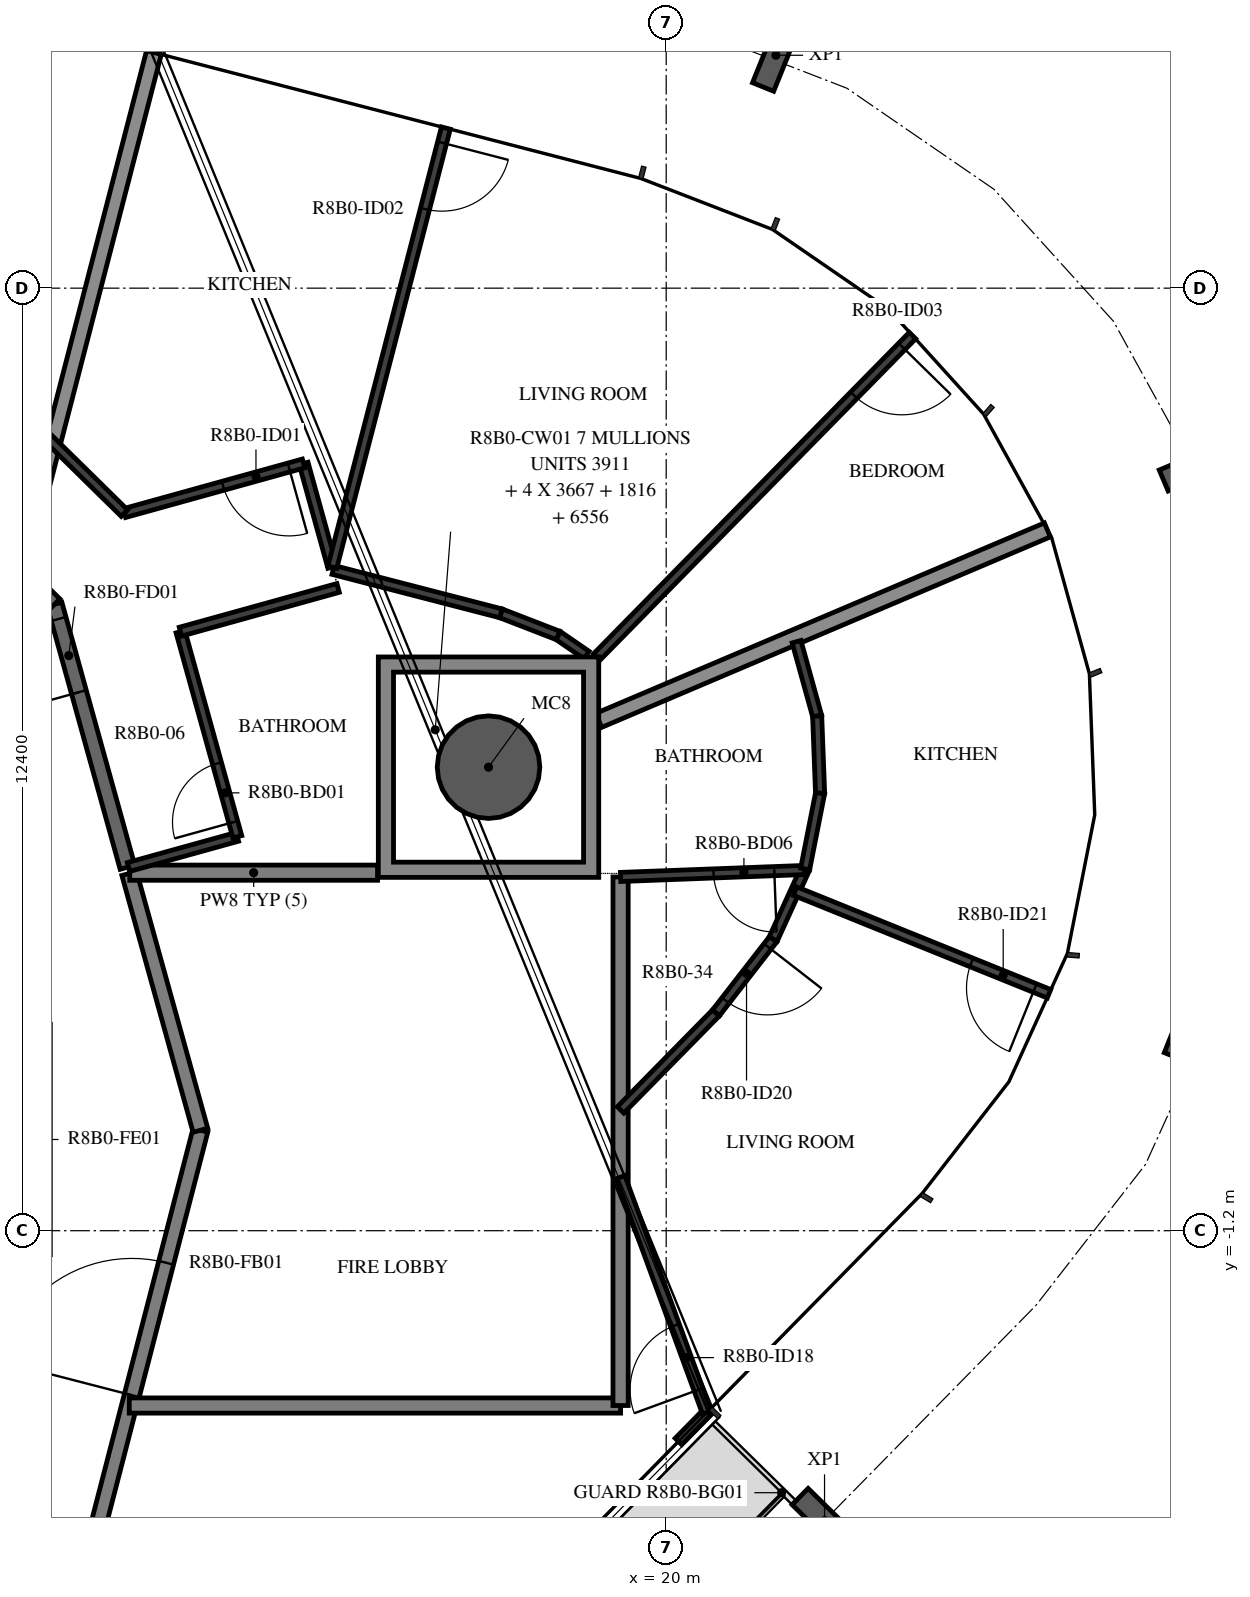
"""IFC4 building model, lengths in metres.
Left out: names, types, materials, properties, quantities, classifications, styles, units other than length and angle.
Written with IfcOpenShell. Run it as: python <this file> out.ifc"""

import sys

from ifc_helpers import new_model, si_unit, direction, frame, frame_2d, origin, origin_2d, place, context, subcontext, project, spatial, polyline, rectangle, hollow_circle, i_section, outline, extrude, element, fill, save


model = new_model("IFC4")
c1 = context("Model", 3, precision=1e-05, world=origin(), true_north=direction((0.0, 1.0)))
c2 = subcontext(c1, "Body", "Model", "MODEL_VIEW")
j1 = project(units=[si_unit("LENGTHUNIT", "METRE"), si_unit("PLANEANGLEUNIT", "RADIAN")], contexts=[c1])
p1 = place(None, origin())
s1 = spatial("IfcSite", under=j1, at=p1, CompositionType="ELEMENT")
p2 = place(p1, origin())
s2 = spatial("IfcBuilding", under=s1, at=p2, CompositionType="ELEMENT")
p3 = place(p2, frame((0.0, 0.0, 312.2)))
s3 = spatial("IfcBuildingStorey", under=s2, at=p3, CompositionType="ELEMENT", Elevation=312.2)
p4 = place(p3, frame((17.663, 4.898, -0.38), z_axis=(0.0, 0.0, 1.0), x_axis=(1.0, 0.0, 0.0)))
e1 = element("IfcColumn", 1, at=p4, inside=s3, PredefinedType="COLUMN", context=c2, shape_type="SweptSolid", body=[
    extrude(hollow_circle(Radius=0.675, WallThickness=0.03, at=origin_2d()), origin(), (0.0, 0.0, 1.0), 3.5),
])
for number, where, z_axis, x_axis in (
    (2, (22.083, -5.013, -0.38), (0.0, 0.0, 1.0), (-0.701, -0.713, 0.0)),
    (3, (27.026, 1.113, -0.38), (0.0, 0.0, 1.0), (-0.375, -0.927, 0.0)),
    (4, (26.96, 8.845, -0.38), (0.0, 0.0, 1.0), (0.391, -0.92, 0.0)),
    (5, (21.443, 14.264, -0.38), (0.0, 0.0, 1.0), (0.927, -0.374, 0.0)),
):
    element("IfcColumn", number, at=place(p3, frame(where, z_axis=z_axis, x_axis=x_axis)), inside=s3, PredefinedType="COLUMN", context=c2, shape_type="SweptSolid", body=[
        extrude(i_section(OverallWidth=0.3, OverallDepth=0.9, WebThickness=0.019, FlangeThickness=0.035, FilletRadius=0.03, at=origin_2d()), origin(), (0.0, 0.0, 1.0), 3.5),
    ])
p5 = place(p3, frame((12.074, -6.831, 0.0), z_axis=(0.0, 0.0, 1.0), x_axis=(0.250391063186, 0.968144780225, 0.0)))
e6 = element("IfcWall", 6, at=p5, inside=s3, PredefinedType="STANDARD", context=c2, shape_type="SweptSolid", body=[
    extrude(rectangle(XDim=7.181, YDim=0.2, at=frame_2d((3.591, 0.0))), origin(), (0.0, 0.0, 1.0), 3.12),
])
p6 = place(p5, frame((3.581, 0.0, 0.0)))
e7 = element("IfcOpeningElement", 7, at=p6, cuts=e6, PredefinedType="OPENING", context=c2, shape_type="SweptSolid", body=[
    extrude(rectangle(XDim=1.8, YDim=2.1, at=frame_2d((0.9, 1.05))), frame((0.0, 0.11, 0.0), z_axis=(0.0, -1.0, 0.0), x_axis=(1.0, 0.0, 0.0)), (0.0, 0.0, 1.0), 0.22),
])
p7 = place(p3, frame((13.872, 0.121, 0.0), z_axis=(0.0, 0.0, 1.0), x_axis=(-0.267291928416, 0.963615600228, 0.0)))
e8 = element("IfcWall", 8, at=p7, inside=s3, PredefinedType="STANDARD", context=c2, shape_type="SweptSolid", body=[
    extrude(rectangle(XDim=3.507, YDim=0.2, at=frame_2d((1.753, 0.0))), origin(), (0.0, 0.0, 1.0), 3.12),
])
p8 = place(p3, frame((12.913, 3.581, 0.0), z_axis=(0.0, 0.0, 1.0), x_axis=(-0.267223005422, 0.963634715737, 0.0)))
e9 = element("IfcWall", 9, at=p8, inside=s3, PredefinedType="STANDARD", context=c2, shape_type="SweptSolid", body=[
    extrude(rectangle(XDim=3.591, YDim=0.2, at=frame_2d((1.795, 0.0))), origin(), (0.0, 0.0, 1.0), 3.12),
])
p9 = place(p8, frame((2.39, 0.0, 0.0)))
e10 = element("IfcOpeningElement", 10, at=p9, cuts=e9, PredefinedType="OPENING", context=c2, shape_type="SweptSolid", body=[
    extrude(rectangle(XDim=1.0, YDim=2.1, at=frame_2d((0.5, 1.05))), frame((0.0, 0.11, 0.0), z_axis=(0.0, -1.0, 0.0), x_axis=(1.0, 0.0, 0.0)), (0.0, 0.0, 1.0), 0.22),
])
p10 = place(p3, frame((11.953, 7.041, 0.0), z_axis=(0.0, 0.0, 1.0), x_axis=(-0.713250549143, 0.70090916255, 0.0)))
e11 = element("IfcWall", 11, at=p10, inside=s3, PredefinedType="STANDARD", context=c2, shape_type="SweptSolid", body=[
    extrude(rectangle(XDim=7.181, YDim=0.2, at=frame_2d((3.59, 0.0))), origin(), (0.0, 0.0, 1.0), 3.12),
])
p11 = place(p10, frame((2.637, 0.0, 0.0)))
e12 = element("IfcOpeningElement", 12, at=p11, cuts=e11, PredefinedType="OPENING", context=c2, shape_type="SweptSolid", body=[
    extrude(rectangle(XDim=1.0, YDim=2.1, at=frame_2d((0.5, 1.05))), frame((0.0, 0.11, 0.0), z_axis=(0.0, -1.0, 0.0), x_axis=(1.0, 0.0, 0.0)), (0.0, 0.0, 1.0), 0.22),
])
p12 = place(p3, frame((16.203, 3.51, 0.0), z_axis=(0.0, 0.0, 1.0), x_axis=(-1.0, 0.0, 0.0)))
e13 = element("IfcWall", 13, at=p12, inside=s3, PredefinedType="STANDARD", context=c2, shape_type="SweptSolid", body=[
    extrude(rectangle(XDim=3.26, YDim=0.2, at=frame_2d((1.63, 0.0))), origin(), (0.0, 0.0, 1.0), 3.12),
])
p13 = place(p3, frame((12.936, -3.5, 0.0), z_axis=(0.0, 0.0, 1.0), x_axis=(1.0, 0.0, 0.0)))
e14 = element("IfcWall", 14, at=p13, inside=s3, PredefinedType="STANDARD", context=c2, shape_type="SweptSolid", body=[
    extrude(rectangle(XDim=6.464, YDim=0.2, at=frame_2d((3.232, 0.0))), origin(), (0.0, 0.0, 1.0), 3.12),
])
p14 = place(p3, frame((19.4, -3.5, 0.0), z_axis=(0.0, 0.0, 1.0), x_axis=(0.0, 1.0, 0.0)))
e15 = element("IfcWall", 15, at=p14, inside=s3, PredefinedType="STANDARD", context=c2, shape_type="SweptSolid", body=[
    extrude(rectangle(XDim=6.954, YDim=0.2, at=frame_2d((3.477, 0.0))), origin(), (0.0, 0.0, 1.0), 3.12),
])
p15 = place(p3, frame((13.26, 14.3, 0.0), z_axis=(0.0, 0.0, 1.0), x_axis=(-0.250397400042, -0.968143141303, 0.0)))
e16 = element("IfcWall", 16, at=p15, inside=s3, PredefinedType="STANDARD", context=c2, shape_type="SweptSolid", body=[
    extrude(rectangle(XDim=7.037, YDim=0.2, at=frame_2d((3.518, 0.0))), origin(), (0.0, 0.0, 1.0), 2.73),
])
p16 = place(p3, frame((19.113, 5.514, 0.0), z_axis=(0.0, 0.0, 1.0), x_axis=(0.920500452946, 0.390741495269, 0.0)))
e17 = element("IfcWall", 17, at=p16, inside=s3, PredefinedType="STANDARD", context=c2, shape_type="SweptSolid", body=[
    extrude(rectangle(XDim=6.412, YDim=0.2, at=frame_2d((3.206, 0.0))), origin(), (0.0, 0.0, 1.0), 2.73),
])
p17 = place(p3, frame((12.927, 3.585, 0.0), z_axis=(0.0, 0.0, 1.0), x_axis=(0.963616756608, 0.26728775951, 0.0)))
e18 = element("IfcWall", 18, at=p17, inside=s3, PredefinedType="PARTITIONING", context=c2, shape_type="SweptSolid", body=[
    extrude(rectangle(XDim=1.485, YDim=0.12, at=frame_2d((0.743, 0.0))), origin(), (0.0, 0.0, 1.0), 3.12),
])
p18 = place(p3, frame((14.358, 3.982, 0.0), z_axis=(0.0, 0.0, 1.0), x_axis=(-0.267275166053, 0.963620249689, 0.0)))
e19 = element("IfcWall", 19, at=p18, inside=s3, PredefinedType="PARTITIONING", context=c2, shape_type="SweptSolid", body=[
    extrude(rectangle(XDim=2.801, YDim=0.12, at=frame_2d((1.4, 0.0))), origin(), (0.0, 0.0, 1.0), 3.12),
])
p19 = place(p18, frame((0.2, 0.0, 0.0)))
e20 = element("IfcOpeningElement", 20, at=p19, cuts=e19, PredefinedType="OPENING", context=c2, shape_type="SweptSolid", body=[
    extrude(rectangle(XDim=0.8, YDim=2.1, at=frame_2d((0.4, 1.05))), frame((0.0, 0.07, 0.0), z_axis=(0.0, -1.0, 0.0), x_axis=(1.0, 0.0, 0.0)), (0.0, 0.0, 1.0), 0.14),
])
p20 = place(p3, frame((13.61, 6.681, 0.0), z_axis=(0.0, 0.0, 1.0), x_axis=(0.963626714087, 0.267251858551, 0.0)))
e21 = element("IfcWall", 21, at=p20, inside=s3, PredefinedType="PARTITIONING", context=c2, shape_type="SweptSolid", body=[
    extrude(rectangle(XDim=2.152, YDim=0.12, at=frame_2d((1.076, 0.0))), origin(), (0.0, 0.0, 1.0), 3.12),
])
p21 = place(p3, frame((15.608, 7.53, 0.0), z_axis=(0.0, 0.0, 1.0), x_axis=(-0.267172351994, 0.963648760872, 0.0)))
e22 = element("IfcWall", 22, at=p21, inside=s3, PredefinedType="PARTITIONING", context=c2, shape_type="SweptSolid", body=[
    extrude(rectangle(XDim=1.416, YDim=0.12, at=frame_2d((0.708, 0.0))), origin(), (0.0, 0.0, 1.0), 3.12),
])
p22 = place(p3, frame((15.229, 8.894, 0.0), z_axis=(0.0, 0.0, 1.0), x_axis=(-0.96363793677, -0.267211389759, 0.0)))
e23 = element("IfcWall", 23, at=p22, inside=s3, PredefinedType="PARTITIONING", context=c2, shape_type="SweptSolid", body=[
    extrude(rectangle(XDim=2.446, YDim=0.12, at=frame_2d((1.223, 0.0))), origin(), (0.0, 0.0, 1.0), 3.12),
])
p23 = place(p22, frame((0.2, 0.0, 0.0)))
e24 = element("IfcOpeningElement", 24, at=p23, cuts=e23, PredefinedType="OPENING", context=c2, shape_type="SweptSolid", body=[
    extrude(rectangle(XDim=0.9, YDim=2.1, at=frame_2d((0.45, 1.05))), frame((0.0, 0.07, 0.0), z_axis=(0.0, -1.0, 0.0), x_axis=(1.0, 0.0, 0.0)), (0.0, 0.0, 1.0), 0.14),
])
p24 = place(p3, frame((12.873, 8.24, 0.0), z_axis=(0.0, 0.0, 1.0), x_axis=(-0.713251042219, 0.700908660792, 0.0)))
e25 = element("IfcWall", 25, at=p24, inside=s3, PredefinedType="PARTITIONING", context=c2, shape_type="SweptSolid", body=[
    extrude(rectangle(XDim=7.398, YDim=0.12, at=frame_2d((3.699, 0.0))), origin(), (0.0, 0.0, 1.0), 3.12),
])
p25 = place(p24, frame((1.718, 0.0, 0.0)))
e26 = element("IfcOpeningElement", 26, at=p25, cuts=e25, PredefinedType="OPENING", context=c2, shape_type="SweptSolid", body=[
    extrude(rectangle(XDim=0.9, YDim=2.1, at=frame_2d((0.45, 1.05))), frame((0.0, 0.07, 0.0), z_axis=(0.0, -1.0, 0.0), x_axis=(1.0, 0.0, 0.0)), (0.0, 0.0, 1.0), 0.14),
])
p26 = place(p3, frame((23.24, 10.576, 0.0), z_axis=(0.0, 0.0, 1.0), x_axis=(-0.700776156398, -0.713381229515, 0.0)))
e27 = element("IfcWall", 27, at=p26, inside=s3, PredefinedType="PARTITIONING", context=c2, shape_type="SweptSolid", body=[
    extrude(rectangle(XDim=5.927, YDim=0.12, at=frame_2d((2.963, 0.0))), origin(), (0.0, 0.0, 1.0), 3.12),
])
p27 = place(p26, frame((0.2, 0.0, 0.0)))
e28 = element("IfcOpeningElement", 28, at=p27, cuts=e27, PredefinedType="OPENING", context=c2, shape_type="SweptSolid", body=[
    extrude(rectangle(XDim=0.9, YDim=2.1, at=frame_2d((0.45, 1.05))), frame((0.0, 0.07, 0.0), z_axis=(0.0, -1.0, 0.0), x_axis=(1.0, 0.0, 0.0)), (0.0, 0.0, 1.0), 0.14),
])
p28 = place(p3, frame((18.952, 6.373, 0.0), z_axis=(0.0, 0.0, 1.0), x_axis=(-0.82412024189, 0.566414889377, 0.0)))
e29 = element("IfcWall", 29, at=p28, inside=s3, PredefinedType="PARTITIONING", context=c2, shape_type="SweptSolid", body=[
    extrude(rectangle(XDim=0.455, YDim=0.12, at=frame_2d((0.228, 0.0))), origin(), (0.0, 0.0, 1.0), 3.12),
])
p29 = place(p3, frame((18.577, 6.631, 0.0), z_axis=(0.0, 0.0, 1.0), x_axis=(-0.932531937323, 0.361087504455, 0.0)))
e30 = element("IfcWall", 30, at=p29, inside=s3, PredefinedType="PARTITIONING", context=c2, shape_type="SweptSolid", body=[
    extrude(rectangle(XDim=0.807, YDim=0.12, at=frame_2d((0.403, 0.0))), origin(), (0.0, 0.0, 1.0), 3.12),
])
p30 = place(p3, frame((17.825, 6.922, 0.0), z_axis=(0.0, 0.0, 1.0), x_axis=(-0.968151834511, 0.250363785985, 0.0)))
e31 = element("IfcWall", 31, at=p30, inside=s3, PredefinedType="PARTITIONING", context=c2, shape_type="SweptSolid", body=[
    extrude(rectangle(XDim=2.28, YDim=0.12, at=frame_2d((1.14, 0.0))), origin(), (0.0, 0.0, 1.0), 3.12),
])
p31 = place(p3, frame((17.102, 13.307, 0.0), z_axis=(0.0, 0.0, 1.0), x_axis=(-0.250374225748, -0.968149134731, 0.0)))
e32 = element("IfcWall", 32, at=p31, inside=s3, PredefinedType="PARTITIONING", context=c2, shape_type="SweptSolid", body=[
    extrude(rectangle(XDim=5.967, YDim=0.12, at=frame_2d((2.983, 0.0))), origin(), (0.0, 0.0, 1.0), 3.12),
])
p32 = place(p31, frame((0.2, 0.0, 0.0)))
e33 = element("IfcOpeningElement", 33, at=p32, cuts=e32, PredefinedType="OPENING", context=c2, shape_type="SweptSolid", body=[
    extrude(rectangle(XDim=0.9, YDim=2.1, at=frame_2d((0.45, 1.05))), frame((0.0, 0.07, 0.0), z_axis=(0.0, -1.0, 0.0), x_axis=(1.0, 0.0, 0.0)), (0.0, 0.0, 1.0), 0.14),
])
p33 = place(p3, frame((20.566, -3.561, 0.0), z_axis=(0.0, 0.0, 1.0), x_axis=(-0.700950066256, -0.713210350889, 0.0)))
e34 = element("IfcWall", 34, at=p33, inside=s3, PredefinedType="PARTITIONING", context=c2, shape_type="SweptSolid", body=[
    extrude(rectangle(XDim=0.577, YDim=0.12, at=frame_2d((0.289, 0.0))), origin(), (0.0, 0.0, 1.0), 3.12),
])
p34 = place(p3, frame((20.535, -3.593, 0.0), z_axis=(0.0, 0.0, 1.0), x_axis=(-0.344065452993, 0.93894566619, 0.0)))
e35 = element("IfcWall", 35, at=p34, inside=s3, PredefinedType="PARTITIONING", context=c2, shape_type="SweptSolid", body=[
    extrude(rectangle(XDim=3.299, YDim=0.12, at=frame_2d((1.649, 0.0))), origin(), (0.0, 0.0, 1.0), 3.12),
])
p35 = place(p34, frame((0.32, 0.0, 0.0)))
e36 = element("IfcOpeningElement", 36, at=p35, cuts=e35, PredefinedType="OPENING", context=c2, shape_type="SweptSolid", body=[
    extrude(rectangle(XDim=0.9, YDim=2.1, at=frame_2d((0.45, 1.05))), frame((0.0, 0.07, 0.0), z_axis=(0.0, -1.0, 0.0), x_axis=(1.0, 0.0, 0.0)), (0.0, 0.0, 1.0), 0.14),
])
p36 = place(p3, frame((21.828, 3.558, 0.0), z_axis=(0.0, 0.0, 1.0), x_axis=(-0.414726005229, -0.909946339399, 0.0)))
e37 = element("IfcWall", 37, at=p36, inside=s3, PredefinedType="PARTITIONING", context=c2, shape_type="SweptSolid", body=[
    extrude(rectangle(XDim=1.016, YDim=0.12, at=frame_2d((0.508, 0.0))), origin(), (0.0, 0.0, 1.0), 3.12),
])
p37 = place(p3, frame((21.406, 2.634, 0.0), z_axis=(0.0, 0.0, 1.0), x_axis=(-0.613444581667, -0.789737769911, 0.0)))
e38 = element("IfcWall", 38, at=p37, inside=s3, PredefinedType="PARTITIONING", context=c2, shape_type="SweptSolid", body=[
    extrude(rectangle(XDim=1.227, YDim=0.12, at=frame_2d((0.614, 0.0))), origin(), (0.0, 0.0, 1.0), 3.12),
])
p38 = place(p37, frame((0.12, 0.0, 0.0)))
e39 = element("IfcOpeningElement", 39, at=p38, cuts=e38, PredefinedType="OPENING", context=c2, shape_type="SweptSolid", body=[
    extrude(rectangle(XDim=0.9, YDim=2.1, at=frame_2d((0.45, 1.05))), frame((0.0, 0.07, 0.0), z_axis=(0.0, -1.0, 0.0), x_axis=(1.0, 0.0, 0.0)), (0.0, 0.0, 1.0), 0.14),
])
p39 = place(p3, frame((20.654, 1.665, 0.0), z_axis=(0.0, 0.0, 1.0), x_axis=(-0.700870484553, -0.713288555833, 0.0)))
e40 = element("IfcWall", 40, at=p39, inside=s3, PredefinedType="PARTITIONING", context=c2, shape_type="SweptSolid", body=[
    extrude(rectangle(XDim=1.789, YDim=0.12, at=frame_2d((0.895, 0.0))), origin(), (0.0, 0.0, 1.0), 3.12),
])
p40 = place(p3, frame((25.036, 1.917, 0.0), z_axis=(0.0, 0.0, 1.0), x_axis=(-0.927096540393, 0.374822631108, 0.0)))
e41 = element("IfcWall", 41, at=p40, inside=s3, PredefinedType="PARTITIONING", context=c2, shape_type="SweptSolid", body=[
    extrude(rectangle(XDim=3.603, YDim=0.12, at=frame_2d((1.802, 0.0))), origin(), (0.0, 0.0, 1.0), 2.73),
])
p41 = place(p40, frame((0.2, 0.0, 0.0)))
e42 = element("IfcOpeningElement", 42, at=p41, cuts=e41, PredefinedType="OPENING", context=c2, shape_type="SweptSolid", body=[
    extrude(rectangle(XDim=0.9, YDim=2.1, at=frame_2d((0.45, 1.05))), frame((0.0, 0.07, 0.0), z_axis=(0.0, -1.0, 0.0), x_axis=(1.0, 0.0, 0.0)), (0.0, 0.0, 1.0), 0.14),
])
p42 = place(p3, frame((21.822, 3.545, 0.0), z_axis=(0.0, 0.0, 1.0), x_axis=(-0.999286397149, -0.037771635816, 0.0)))
e43 = element("IfcWall", 43, at=p42, inside=s3, PredefinedType="PARTITIONING", context=c2, shape_type="SweptSolid", body=[
    extrude(rectangle(XDim=2.424, YDim=0.12, at=frame_2d((1.212, 0.0))), origin(), (0.0, 0.0, 1.0), 3.12),
])
p43 = place(p42, frame((0.4, 0.0, 0.0)))
e44 = element("IfcOpeningElement", 44, at=p43, cuts=e43, PredefinedType="OPENING", context=c2, shape_type="SweptSolid", body=[
    extrude(rectangle(XDim=0.8, YDim=2.1, at=frame_2d((0.4, 1.05))), frame((0.0, 0.07, 0.0), z_axis=(0.0, -1.0, 0.0), x_axis=(1.0, 0.0, 0.0)), (0.0, 0.0, 1.0), 0.14),
])
for number, where, z_axis, x_axis in (
    (45, (21.715, 6.549, 0.0), (0.0, 0.0, 1.0), (0.267, -0.964, 0.0)),
    (46, (21.986, 5.57, 0.0), (0.0, 0.0, 1.0), (0.038, -0.999, 0.0)),
    (47, (22.025, 4.555, 0.0), (0.0, 0.0, 1.0), (-0.194, -0.981, 0.0)),
):
    element("IfcWall", number, at=place(p3, frame(where, z_axis=z_axis, x_axis=x_axis)), inside=s3, PredefinedType="PARTITIONING", context=c2, shape_type="SweptSolid", body=[
        extrude(rectangle(XDim=1.016, YDim=0.12, at=frame_2d((0.508, 0.0))), origin(), (0.0, 0.0, 1.0), 3.12),
    ])
p44 = place(p3, origin())
e48 = element("IfcWall", 48, at=p44, inside=s3, PredefinedType="STANDARD", context=c2, shape_type="SweptSolid", body=[
    extrude(outline(polyline([(19.113, 6.348), (19.113, 3.448), (16.213, 3.448), (16.213, 6.348), (19.113, 6.348)]), holes=[polyline([(16.413, 3.648), (18.913, 3.648), (18.913, 6.148), (16.413, 6.148), (16.413, 3.648)])]), origin(), (0.0, 0.0, 1.0), 3.12),
])
p45 = place(p9, origin())
e49 = element("IfcDoor", 49, at=p45, inside=s3, OperationType="SINGLE_SWING_LEFT", PredefinedType="DOOR", context=c2, shape_type="SweptSolid", body=[
    extrude(rectangle(XDim=1.0, YDim=2.1, at=frame_2d((0.5, 1.05))), frame((0.0, 0.025, 0.0), z_axis=(0.0, -1.0, 0.0), x_axis=(1.0, 0.0, 0.0)), (0.0, 0.0, 1.0), 0.05),
])
fill(e10, e49)
p46 = place(p19, origin())
e50 = element("IfcDoor", 50, at=p46, inside=s3, OperationType="SINGLE_SWING_LEFT", PredefinedType="DOOR", context=c2, shape_type="SweptSolid", body=[
    extrude(rectangle(XDim=0.8, YDim=2.1, at=frame_2d((0.4, 1.05))), frame((0.0, 0.025, 0.0), z_axis=(0.0, -1.0, 0.0), x_axis=(1.0, 0.0, 0.0)), (0.0, 0.0, 1.0), 0.05),
])
fill(e20, e50)
p47 = place(p23, origin())
e51 = element("IfcDoor", 51, at=p47, inside=s3, OperationType="SINGLE_SWING_LEFT", PredefinedType="DOOR", context=c2, shape_type="SweptSolid", body=[
    extrude(rectangle(XDim=0.9, YDim=2.1, at=frame_2d((0.45, 1.05))), frame((0.0, 0.025, 0.0), z_axis=(0.0, -1.0, 0.0), x_axis=(1.0, 0.0, 0.0)), (0.0, 0.0, 1.0), 0.05),
])
fill(e24, e51)
p48 = place(p32, origin())
e52 = element("IfcDoor", 52, at=p48, inside=s3, OperationType="SINGLE_SWING_LEFT", PredefinedType="DOOR", context=c2, shape_type="SweptSolid", body=[
    extrude(rectangle(XDim=0.9, YDim=2.1, at=frame_2d((0.45, 1.05))), frame((0.0, 0.025, 0.0), z_axis=(0.0, -1.0, 0.0), x_axis=(1.0, 0.0, 0.0)), (0.0, 0.0, 1.0), 0.05),
])
fill(e33, e52)
p49 = place(p27, origin())
e53 = element("IfcDoor", 53, at=p49, inside=s3, OperationType="SINGLE_SWING_LEFT", PredefinedType="DOOR", context=c2, shape_type="SweptSolid", body=[
    extrude(rectangle(XDim=0.9, YDim=2.1, at=frame_2d((0.45, 1.05))), frame((0.0, 0.025, 0.0), z_axis=(0.0, -1.0, 0.0), x_axis=(1.0, 0.0, 0.0)), (0.0, 0.0, 1.0), 0.05),
])
fill(e28, e53)
p50 = place(p35, origin())
e54 = element("IfcDoor", 54, at=p50, inside=s3, OperationType="SINGLE_SWING_RIGHT", PredefinedType="DOOR", context=c2, shape_type="SweptSolid", body=[
    extrude(rectangle(XDim=0.9, YDim=2.1, at=frame_2d((0.45, 1.05))), frame((0.0, 0.025, 0.0), z_axis=(0.0, -1.0, 0.0), x_axis=(1.0, 0.0, 0.0)), (0.0, 0.0, 1.0), 0.05),
])
fill(e36, e54)
p51 = place(p38, origin())
e55 = element("IfcDoor", 55, at=p51, inside=s3, OperationType="SINGLE_SWING_RIGHT", PredefinedType="DOOR", context=c2, shape_type="SweptSolid", body=[
    extrude(rectangle(XDim=0.9, YDim=2.1, at=frame_2d((0.45, 1.05))), frame((0.0, 0.025, 0.0), z_axis=(0.0, -1.0, 0.0), x_axis=(1.0, 0.0, 0.0)), (0.0, 0.0, 1.0), 0.05),
])
fill(e39, e55)
p52 = place(p43, origin())
e56 = element("IfcDoor", 56, at=p52, inside=s3, OperationType="SINGLE_SWING_RIGHT", PredefinedType="DOOR", context=c2, shape_type="SweptSolid", body=[
    extrude(rectangle(XDim=0.8, YDim=2.1, at=frame_2d((0.4, 1.05))), frame((0.0, 0.025, 0.0), z_axis=(0.0, -1.0, 0.0), x_axis=(1.0, 0.0, 0.0)), (0.0, 0.0, 1.0), 0.05),
])
fill(e44, e56)
p53 = place(p41, origin())
e57 = element("IfcDoor", 57, at=p53, inside=s3, OperationType="SINGLE_SWING_RIGHT", PredefinedType="DOOR", context=c2, shape_type="SweptSolid", body=[
    extrude(rectangle(XDim=0.9, YDim=2.1, at=frame_2d((0.45, 1.05))), frame((0.0, 0.025, 0.0), z_axis=(0.0, -1.0, 0.0), x_axis=(1.0, 0.0, 0.0)), (0.0, 0.0, 1.0), 0.05),
])
fill(e42, e57)
p54 = place(p6, origin())
e58 = element("IfcDoor", 58, at=p54, inside=s3, OperationType="DOUBLE_DOOR_SINGLE_SWING", PredefinedType="DOOR", context=c2, shape_type="SweptSolid", body=[
    extrude(rectangle(XDim=1.8, YDim=2.1, at=frame_2d((0.9, 1.05))), frame((0.0, 0.025, 0.0), z_axis=(0.0, -1.0, 0.0), x_axis=(1.0, 0.0, 0.0)), (0.0, 0.0, 1.0), 0.05),
])
fill(e7, e58)
save(model, sys.argv[1])
